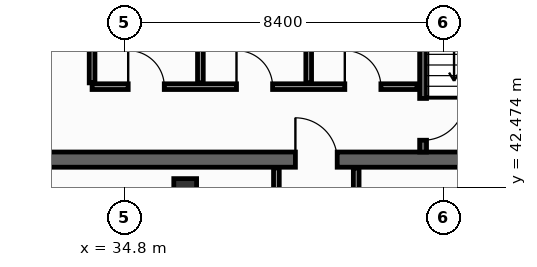
"""IFC4 building model, lengths in metres.
Left out: names, types, materials, properties, quantities, classifications, styles, units other than length and angle.
Written with IfcOpenShell. Run it as: python <this file> out.ifc"""

import sys

from ifc_helpers import new_model, si_unit, direction, frame, frame_2d, origin, origin_2d, place, context, subcontext, project, spatial, rectangle, hollow_rectangle, extrude, element, fill, save


model = new_model("IFC4")
c1 = context("Model", 3, precision=1e-05, world=origin(), true_north=direction((0.0, 1.0)))
c2 = subcontext(c1, "Body", "Model", "MODEL_VIEW")
j1 = project(units=[si_unit("LENGTHUNIT", "METRE"), si_unit("PLANEANGLEUNIT", "RADIAN")], contexts=[c1])
p1 = place(None, origin())
s1 = spatial("IfcSite", under=j1, at=p1, CompositionType="ELEMENT")
p2 = place(p1, origin())
s2 = spatial("IfcBuilding", under=s1, at=p2, CompositionType="ELEMENT")
p3 = place(p2, frame((0.0, 0.0, 264.8)))
s3 = spatial("IfcBuildingStorey", under=s2, at=p3, CompositionType="ELEMENT", Elevation=264.8)
p4 = place(p3, frame((13.7, 43.2, 0.0), z_axis=(0.0, 0.0, 1.0), x_axis=(1.0, 0.0, 0.0)))
e1 = element("IfcWall", 1, at=p4, inside=s3, PredefinedType="SHEAR", context=c2, shape_type="SweptSolid", body=[
    extrude(rectangle(XDim=32.5, YDim=0.4, at=frame_2d((16.25, 0.0))), origin(), (0.0, 0.0, 1.0), 3.55),
])
p5 = place(p4, frame((5.4, 0.0, 0.0)))
e2 = element("IfcOpeningElement", 2, at=p5, cuts=e1, PredefinedType="OPENING", context=c2, shape_type="SweptSolid", body=[
    extrude(rectangle(XDim=1.1, YDim=2.15, at=frame_2d((0.55, 1.075))), frame((0.0, 0.21, 0.0), z_axis=(0.0, -1.0, 0.0), x_axis=(1.0, 0.0, 0.0)), (0.0, 0.0, 1.0), 0.42),
])
p6 = place(p4, frame((25.6, 0.0, 0.0)))
e3 = element("IfcOpeningElement", 3, at=p6, cuts=e1, PredefinedType="OPENING", context=c2, shape_type="SweptSolid", body=[
    extrude(rectangle(XDim=1.1, YDim=2.15, at=frame_2d((0.55, 1.075))), frame((0.0, 0.21, 0.0), z_axis=(0.0, -1.0, 0.0), x_axis=(1.0, 0.0, 0.0)), (0.0, 0.0, 1.0), 0.42),
])
p7 = place(p3, frame((36.4, 42.4, 0.0), z_axis=(0.0, 0.0, 1.0), x_axis=(1.0, 0.0, 0.0)))
e4 = element("IfcColumn", 4, at=p7, inside=s3, PredefinedType="COLUMN", context=c2, shape_type="SweptSolid", body=[
    extrude(hollow_rectangle(XDim=0.6, YDim=0.6, WallThickness=0.028, at=origin_2d()), origin(), (0.0, 0.0, 1.0), 3.8),
])
p8 = place(p3, frame((42.66, 53.8, 0.0), z_axis=(0.0, 0.0, 1.0), x_axis=(0.0, -1.0, 0.0)))
e5 = element("IfcWall", 5, at=p8, inside=s3, PredefinedType="SHEAR", context=c2, shape_type="SweptSolid", body=[
    extrude(rectangle(XDim=10.4, YDim=0.18, at=frame_2d((5.2, 0.0))), origin(), (0.0, 0.0, 1.0), 3.55),
])
p9 = place(p8, frame((8.99, 0.0, 0.0)))
e6 = element("IfcOpeningElement", 6, at=p9, cuts=e5, PredefinedType="OPENING", context=c2, shape_type="SweptSolid", body=[
    extrude(rectangle(XDim=1.1, YDim=2.15, at=frame_2d((0.55, 1.075))), frame((0.0, 0.1, 0.0), z_axis=(0.0, -1.0, 0.0), x_axis=(1.0, 0.0, 0.0)), (0.0, 0.0, 1.0), 0.2),
])
p10 = place(p3, frame((33.95, 45.12, 0.0), z_axis=(0.0, 0.0, 1.0), x_axis=(1.0, 0.0, 0.0)))
e7 = element("IfcWall", 7, at=p10, inside=s3, PredefinedType="PARTITIONING", context=c2, shape_type="SweptSolid", body=[
    extrude(rectangle(XDim=8.55, YDim=0.15, at=frame_2d((4.275, 0.0))), origin(), (0.0, 0.0, 1.0), 3.55),
])
p11 = place(p10, frame((0.95, 0.0, 0.0)))
e8 = element("IfcOpeningElement", 8, at=p11, cuts=e7, PredefinedType="OPENING", context=c2, shape_type="SweptSolid", body=[
    extrude(rectangle(XDim=0.95, YDim=2.15, at=frame_2d((0.475, 1.075))), frame((0.0, 0.085, 0.0), z_axis=(0.0, -1.0, 0.0), x_axis=(1.0, 0.0, 0.0)), (0.0, 0.0, 1.0), 0.17),
])
p12 = place(p10, frame((3.8, 0.0, 0.0)))
e9 = element("IfcOpeningElement", 9, at=p12, cuts=e7, PredefinedType="OPENING", context=c2, shape_type="SweptSolid", body=[
    extrude(rectangle(XDim=0.95, YDim=2.15, at=frame_2d((0.475, 1.075))), frame((0.0, 0.085, 0.0), z_axis=(0.0, -1.0, 0.0), x_axis=(1.0, 0.0, 0.0)), (0.0, 0.0, 1.0), 0.17),
])
p13 = place(p10, frame((6.65, 0.0, 0.0)))
e10 = element("IfcOpeningElement", 10, at=p13, cuts=e7, PredefinedType="OPENING", context=c2, shape_type="SweptSolid", body=[
    extrude(rectangle(XDim=0.95, YDim=2.15, at=frame_2d((0.475, 1.075))), frame((0.0, 0.085, 0.0), z_axis=(0.0, -1.0, 0.0), x_axis=(1.0, 0.0, 0.0)), (0.0, 0.0, 1.0), 0.17),
])
for number, where, z_axis, x_axis in (
    (11, (33.95, 45.22, 0.0), (0.0, 0.0, 1.0), (0.0, 1.0, 0.0)),
    (12, (36.8, 45.22, 0.0), (0.0, 0.0, 1.0), (0.0, 1.0, 0.0)),
    (13, (39.65, 45.22, 0.0), (0.0, 0.0, 1.0), (0.0, 1.0, 0.0)),
):
    element("IfcWall", number, at=place(p3, frame(where, z_axis=z_axis, x_axis=x_axis)), inside=s3, PredefinedType="PARTITIONING", context=c2, shape_type="SweptSolid", body=[
        extrude(rectangle(XDim=2.33, YDim=0.15, at=frame_2d((1.165, 0.0))), origin(), (0.0, 0.0, 1.0), 3.55),
    ])
for number, where, z_axis, x_axis in (
    (14, (38.8, 40.75, 0.0), (0.0, 0.0, 1.0), (0.0, 1.0, 0.0)),
    (15, (40.9, 40.75, 0.0), (0.0, 0.0, 1.0), (0.0, 1.0, 0.0)),
):
    element("IfcWall", number, at=place(p3, frame(where, z_axis=z_axis, x_axis=x_axis)), inside=s3, PredefinedType="PARTITIONING", context=c2, shape_type="SweptSolid", body=[
        extrude(rectangle(XDim=2.23, YDim=0.15, at=frame_2d((1.115, 0.0))), origin(), (0.0, 0.0, 1.0), 3.55),
    ])
p14 = place(p9, origin())
e16 = element("IfcDoor", 16, at=p14, inside=s3, OperationType="SINGLE_SWING_LEFT", PredefinedType="DOOR", context=c2, shape_type="SweptSolid", body=[
    extrude(rectangle(XDim=1.1, YDim=2.15, at=frame_2d((0.55, 1.075))), frame((0.0, 0.025, 0.0), z_axis=(0.0, -1.0, 0.0), x_axis=(1.0, 0.0, 0.0)), (0.0, 0.0, 1.0), 0.05),
])
fill(e6, e16)
p15 = place(p6, origin())
e17 = element("IfcDoor", 17, at=p15, inside=s3, OperationType="SINGLE_SWING_LEFT", PredefinedType="DOOR", context=c2, shape_type="SweptSolid", body=[
    extrude(rectangle(XDim=1.1, YDim=2.15, at=frame_2d((0.55, 1.075))), frame((0.0, 0.025, 0.0), z_axis=(0.0, -1.0, 0.0), x_axis=(1.0, 0.0, 0.0)), (0.0, 0.0, 1.0), 0.05),
])
fill(e3, e17)
p16 = place(p11, origin())
e18 = element("IfcDoor", 18, at=p16, inside=s3, OperationType="SINGLE_SWING_LEFT", PredefinedType="DOOR", context=c2, shape_type="SweptSolid", body=[
    extrude(rectangle(XDim=0.95, YDim=2.15, at=frame_2d((0.475, 1.075))), frame((0.0, 0.025, 0.0), z_axis=(0.0, -1.0, 0.0), x_axis=(1.0, 0.0, 0.0)), (0.0, 0.0, 1.0), 0.05),
])
fill(e8, e18)
p17 = place(p12, origin())
e19 = element("IfcDoor", 19, at=p17, inside=s3, OperationType="SINGLE_SWING_LEFT", PredefinedType="DOOR", context=c2, shape_type="SweptSolid", body=[
    extrude(rectangle(XDim=0.95, YDim=2.15, at=frame_2d((0.475, 1.075))), frame((0.0, 0.025, 0.0), z_axis=(0.0, -1.0, 0.0), x_axis=(1.0, 0.0, 0.0)), (0.0, 0.0, 1.0), 0.05),
])
fill(e9, e19)
p18 = place(p13, origin())
e20 = element("IfcDoor", 20, at=p18, inside=s3, OperationType="SINGLE_SWING_LEFT", PredefinedType="DOOR", context=c2, shape_type="SweptSolid", body=[
    extrude(rectangle(XDim=0.95, YDim=2.15, at=frame_2d((0.475, 1.075))), frame((0.0, 0.025, 0.0), z_axis=(0.0, -1.0, 0.0), x_axis=(1.0, 0.0, 0.0)), (0.0, 0.0, 1.0), 0.05),
])
fill(e10, e20)
save(model, sys.argv[1])
